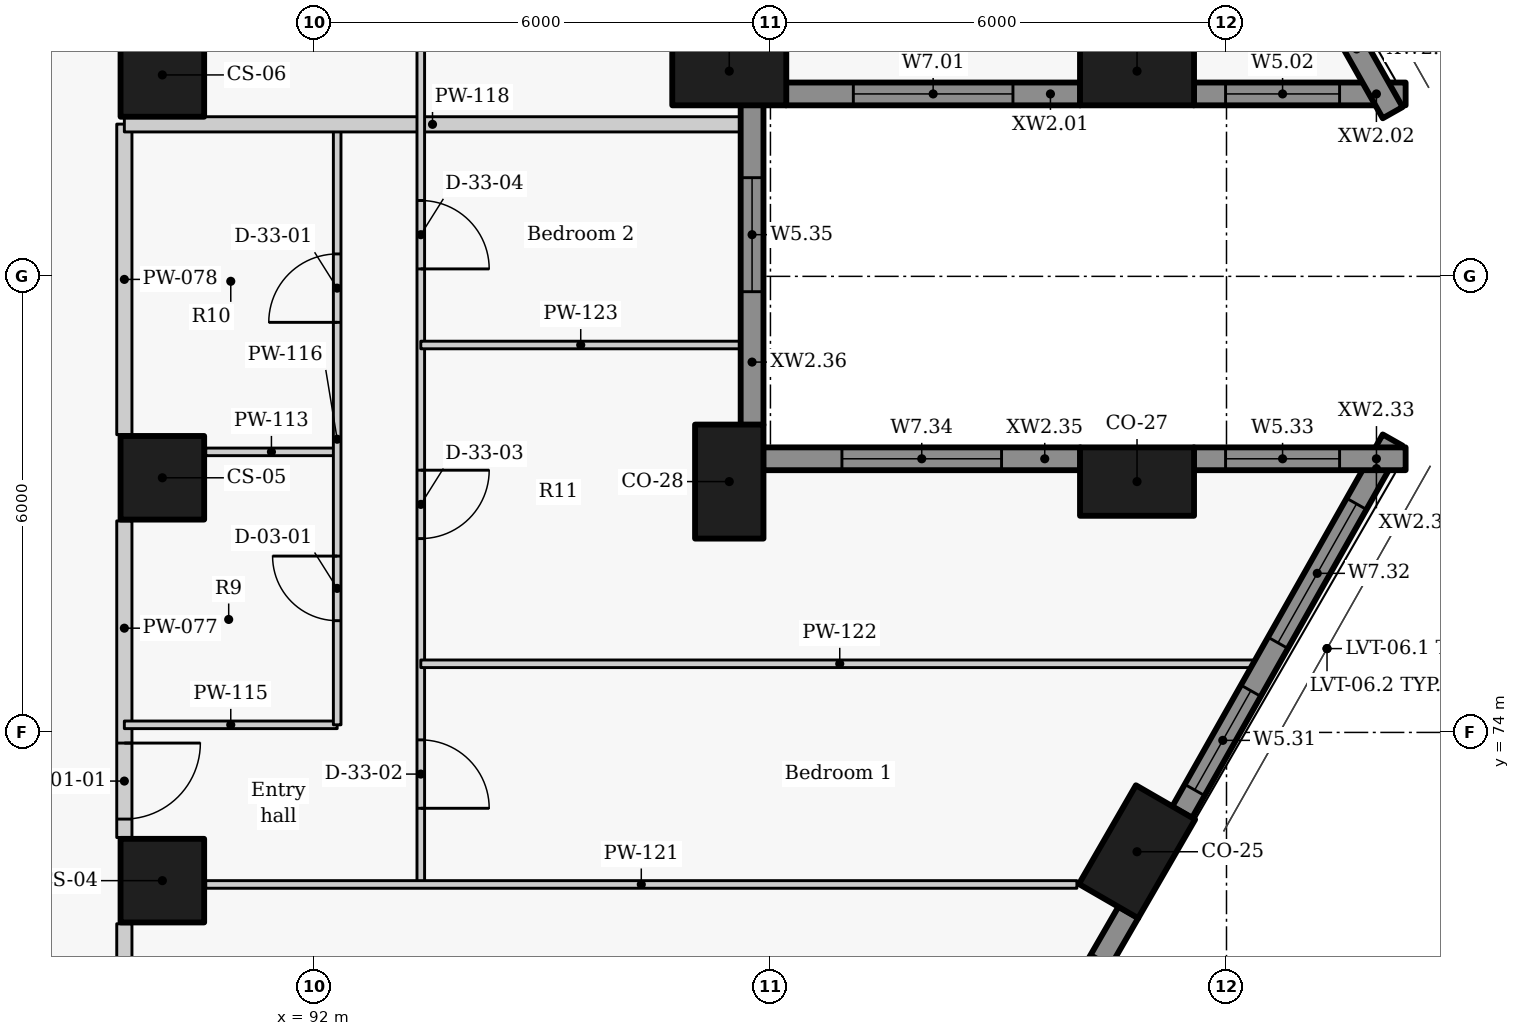
"""IFC4 building model, lengths in metres.
Left out: names, types, materials, properties, quantities, classifications, styles, units other than length and angle.
Written with IfcOpenShell. Run it as: python <this file> out.ifc"""

import sys

from ifc_helpers import new_model, si_unit, direction, frame, frame_2d, origin, origin_2d, place, context, subcontext, project, spatial, rectangle, extrude, element, fill, save


model = new_model("IFC4")
c1 = context("Model", 3, precision=1e-05, world=origin(), true_north=direction((0.0, 1.0)))
c2 = subcontext(c1, "Body", "Model", "MODEL_VIEW")
j1 = project(units=[si_unit("LENGTHUNIT", "METRE"), si_unit("PLANEANGLEUNIT", "RADIAN")], contexts=[c1])
p1 = place(None, origin())
s1 = spatial("IfcSite", under=j1, at=p1, CompositionType="ELEMENT")
p2 = place(p1, origin())
s2 = spatial("IfcBuilding", under=s1, at=p2, CompositionType="ELEMENT")
p3 = place(p2, frame((0.0, 0.0, 41.4)))
s3 = spatial("IfcBuildingStorey", under=s2, at=p3, CompositionType="ELEMENT", Elevation=41.4)
for number, where, z_axis, x_axis in (
    (1, (102.823, 72.43, -0.275), (0.0, 0.0, 1.0), (0.5, 0.866, 0.0)),
    (2, (102.823, 77.3, -0.275), (0.0, 0.0, 1.0), (-1.0, 0.0, 0.0)),
    (3, (97.458, 77.3, -0.275), (0.0, 0.0, 1.0), (0.0, 1.0, 0.0)),
    (4, (97.458, 82.7, -0.275), (0.0, 0.0, 1.0), (1.0, 0.0, 0.0)),
    (5, (102.823, 82.7, -0.275), (0.0, 0.0, 1.0), (1.0, 0.0, 0.0)),
):
    element("IfcColumn", number, at=place(p3, frame(where, z_axis=z_axis, x_axis=x_axis)), inside=s3, PredefinedType="COLUMN", context=c2, shape_type="SweptSolid", body=[
        extrude(rectangle(XDim=1.5, YDim=0.9, at=origin_2d()), origin(), (0.0, 0.0, 1.0), 3.575),
    ])
p4 = place(p3, frame((90.0, 72.05, 0.0), z_axis=(0.0, 0.0, 1.0), x_axis=(0.0, 1.0, 0.0)))
e6 = element("IfcColumn", 6, at=p4, inside=s3, PredefinedType="COLUMN", context=c2, shape_type="SweptSolid", body=[
    extrude(rectangle(XDim=1.1, YDim=1.1, at=origin_2d()), origin(), (0.0, 0.0, 1.0), 3.3),
])
for number, where, z_axis, x_axis in (
    (7, (90.0, 77.35, -0.275), (0.0, 0.0, 1.0), (0.0, 1.0, 0.0)),
    (8, (90.0, 82.65, -0.275), (0.0, 0.0, 1.0), (0.0, 1.0, 0.0)),
):
    element("IfcColumn", number, at=place(p3, frame(where, z_axis=z_axis, x_axis=x_axis)), inside=s3, PredefinedType="COLUMN", context=c2, shape_type="SweptSolid", body=[
        extrude(rectangle(XDim=1.1, YDim=1.1, at=origin_2d()), origin(), (0.0, 0.0, 1.0), 3.575),
    ])
p5 = place(p3, frame((98.204, 82.4, 0.0), z_axis=(0.0, 0.0, 1.0), x_axis=(1.0, 0.0, 0.0)))
e9 = element("IfcWall", 9, at=p5, inside=s3, PredefinedType="SOLIDWALL", context=c2, shape_type="SweptSolid", body=[
    extrude(rectangle(XDim=3.873, YDim=0.3, at=frame_2d((1.936, 0.0))), origin(), (0.0, 0.0, 1.0), 2.425),
])
p6 = place(p5, frame((0.886, 0.0, 0.9)))
e10 = element("IfcOpeningElement", 10, at=p6, cuts=e9, PredefinedType="OPENING", context=c2, shape_type="SweptSolid", body=[
    extrude(rectangle(XDim=2.1, YDim=1.1, at=frame_2d((1.05, 0.55))), frame((0.0, 0.16, 0.0), z_axis=(0.0, -1.0, 0.0), x_axis=(1.0, 0.0, 0.0)), (0.0, 0.0, 1.0), 0.32),
])
p7 = place(p3, frame((103.569, 82.4, 0.0), z_axis=(0.0, 0.0, 1.0), x_axis=(1.0, 0.0, 0.0)))
e11 = element("IfcWall", 11, at=p7, inside=s3, PredefinedType="SOLIDWALL", context=c2, shape_type="SweptSolid", body=[
    extrude(rectangle(XDim=2.788, YDim=0.3, at=frame_2d((1.394, 0.0))), origin(), (0.0, 0.0, 1.0), 2.425),
])
p8 = place(p7, frame((0.419, 0.0, 0.9)))
e12 = element("IfcOpeningElement", 12, at=p8, cuts=e11, PredefinedType="OPENING", context=c2, shape_type="SweptSolid", body=[
    extrude(rectangle(XDim=1.5, YDim=1.1, at=frame_2d((0.75, 0.55))), frame((0.0, 0.16, 0.0), z_axis=(0.0, -1.0, 0.0), x_axis=(1.0, 0.0, 0.0)), (0.0, 0.0, 1.0), 0.32),
])
p9 = place(p3, frame((106.186, 82.153, 0.0), z_axis=(0.0, 0.0, 1.0), x_axis=(-0.492363204642, 0.870389840655, 0.0)))
e13 = element("IfcWall", 13, at=p9, inside=s3, PredefinedType="SOLIDWALL", context=c2, shape_type="SweptSolid", body=[
    extrude(rectangle(XDim=5.626, YDim=0.3, at=frame_2d((2.813, 0.0))), origin(), (0.0, 0.0, 1.0), 2.425),
])
p10 = place(p9, frame((2.026, 0.0, 0.9)))
e14 = element("IfcOpeningElement", 14, at=p10, cuts=e13, PredefinedType="OPENING", context=c2, shape_type="SweptSolid", body=[
    extrude(rectangle(XDim=2.1, YDim=1.1, at=frame_2d((1.05, 0.55))), frame((0.0, 0.16, 0.0), z_axis=(0.0, -1.0, 0.0), x_axis=(1.0, 0.0, 0.0)), (0.0, 0.0, 1.0), 0.32),
])
p11 = place(p3, frame((100.941, 68.571, 0.0), z_axis=(0.0, 0.0, 1.0), x_axis=(0.499977402622, 0.866038449993, 0.0)))
e15 = element("IfcWall", 15, at=p11, inside=s3, PredefinedType="SOLIDWALL", context=c2, shape_type="SweptSolid", body=[
    extrude(rectangle(XDim=3.537, YDim=0.3, at=frame_2d((1.769, 0.0))), origin(), (0.0, 0.0, 1.0), 2.425),
])
p12 = place(p11, frame((0.719, 0.0, 0.9)))
e16 = element("IfcOpeningElement", 16, at=p12, cuts=e15, PredefinedType="OPENING", context=c2, shape_type="SweptSolid", body=[
    extrude(rectangle(XDim=2.1, YDim=1.1, at=frame_2d((1.05, 0.55))), frame((0.0, 0.16, 0.0), z_axis=(0.0, -1.0, 0.0), x_axis=(1.0, 0.0, 0.0)), (0.0, 0.0, 1.0), 0.32),
])
p13 = place(p3, frame((103.416, 72.949, 0.0), z_axis=(0.0, 0.0, 1.0), x_axis=(0.492363204642, 0.870389840655, 0.0)))
e17 = element("IfcWall", 17, at=p13, inside=s3, PredefinedType="SOLIDWALL", context=c2, shape_type="SweptSolid", body=[
    extrude(rectangle(XDim=5.626, YDim=0.3, at=frame_2d((2.813, 0.0))), origin(), (0.0, 0.0, 1.0), 2.425),
])
p14 = place(p13, frame((0.337, 0.0, 0.9)))
e18 = element("IfcOpeningElement", 18, at=p14, cuts=e17, PredefinedType="OPENING", context=c2, shape_type="SweptSolid", body=[
    extrude(rectangle(XDim=1.5, YDim=1.1, at=frame_2d((0.75, 0.55))), frame((0.0, 0.16, 0.0), z_axis=(0.0, -1.0, 0.0), x_axis=(1.0, 0.0, 0.0)), (0.0, 0.0, 1.0), 0.32),
])
p15 = place(p13, frame((2.562, 0.0, 0.9)))
e19 = element("IfcOpeningElement", 19, at=p15, cuts=e17, PredefinedType="OPENING", context=c2, shape_type="SweptSolid", body=[
    extrude(rectangle(XDim=2.1, YDim=1.1, at=frame_2d((1.05, 0.55))), frame((0.0, 0.16, 0.0), z_axis=(0.0, -1.0, 0.0), x_axis=(1.0, 0.0, 0.0)), (0.0, 0.0, 1.0), 0.32),
])
p16 = place(p3, frame((106.357, 77.6, 0.0), z_axis=(0.0, 0.0, 1.0), x_axis=(-1.0, 0.0, 0.0)))
e20 = element("IfcWall", 20, at=p16, inside=s3, PredefinedType="SOLIDWALL", context=c2, shape_type="SweptSolid", body=[
    extrude(rectangle(XDim=2.788, YDim=0.3, at=frame_2d((1.394, 0.0))), origin(), (0.0, 0.0, 1.0), 2.425),
])
p17 = place(p16, frame((0.869, 0.0, 0.9)))
e21 = element("IfcOpeningElement", 21, at=p17, cuts=e20, PredefinedType="OPENING", context=c2, shape_type="SweptSolid", body=[
    extrude(rectangle(XDim=1.5, YDim=1.1, at=frame_2d((0.75, 0.55))), frame((0.0, 0.16, 0.0), z_axis=(0.0, -1.0, 0.0), x_axis=(1.0, 0.0, 0.0)), (0.0, 0.0, 1.0), 0.32),
])
p18 = place(p3, frame((102.077, 77.6, 0.0), z_axis=(0.0, 0.0, 1.0), x_axis=(-1.0, 0.0, 0.0)))
e22 = element("IfcWall", 22, at=p18, inside=s3, PredefinedType="SOLIDWALL", context=c2, shape_type="SweptSolid", body=[
    extrude(rectangle(XDim=4.173, YDim=0.3, at=frame_2d((2.086, 0.0))), origin(), (0.0, 0.0, 1.0), 2.425),
])
p19 = place(p18, frame((1.036, 0.0, 0.9)))
e23 = element("IfcOpeningElement", 23, at=p19, cuts=e22, PredefinedType="OPENING", context=c2, shape_type="SweptSolid", body=[
    extrude(rectangle(XDim=2.1, YDim=1.1, at=frame_2d((1.05, 0.55))), frame((0.0, 0.16, 0.0), z_axis=(0.0, -1.0, 0.0), x_axis=(1.0, 0.0, 0.0)), (0.0, 0.0, 1.0), 0.32),
])
p20 = place(p3, frame((97.758, 78.046, 0.0), z_axis=(0.0, 0.0, 1.0), x_axis=(0.0, 1.0, 0.0)))
e24 = element("IfcWall", 24, at=p20, inside=s3, PredefinedType="SOLIDWALL", context=c2, shape_type="SweptSolid", body=[
    extrude(rectangle(XDim=4.208, YDim=0.3, at=frame_2d((2.104, 0.0))), origin(), (0.0, 0.0, 1.0), 2.425),
])
p21 = place(p20, frame((1.752, 0.0, 0.9)))
e25 = element("IfcOpeningElement", 25, at=p21, cuts=e24, PredefinedType="OPENING", context=c2, shape_type="SweptSolid", body=[
    extrude(rectangle(XDim=1.5, YDim=1.1, at=frame_2d((0.75, 0.55))), frame((0.0, 0.16, 0.0), z_axis=(0.0, -1.0, 0.0), x_axis=(1.0, 0.0, 0.0)), (0.0, 0.0, 1.0), 0.32),
])
p22 = place(p3, frame((89.5, 71.483, 0.0), z_axis=(0.0, 0.0, 1.0), x_axis=(0.0, -1.0, 0.0)))
e26 = element("IfcWall", 26, at=p22, inside=s3, PredefinedType="PARTITIONING", context=c2, shape_type="SweptSolid", body=[
    extrude(rectangle(XDim=3.216, YDim=0.2, at=frame_2d((1.608, 0.0))), origin(), (0.0, 0.0, 1.0), 3.025),
])
p23 = place(p22, frame((1.108, 0.0, 0.0)))
e27 = element("IfcOpeningElement", 27, at=p23, cuts=e26, PredefinedType="OPENING", context=c2, shape_type="SweptSolid", body=[
    extrude(rectangle(XDim=1.0, YDim=2.1, at=frame_2d((0.5, 1.05))), frame((0.0, 0.11, 0.0), z_axis=(0.0, -1.0, 0.0), x_axis=(1.0, 0.0, 0.0)), (0.0, 0.0, 1.0), 0.22),
])
p24 = place(p3, frame((89.5, 76.783, 0.0), z_axis=(0.0, 0.0, 1.0), x_axis=(0.0, -1.0, 0.0)))
e28 = element("IfcWall", 28, at=p24, inside=s3, PredefinedType="PARTITIONING", context=c2, shape_type="SweptSolid", body=[
    extrude(rectangle(XDim=4.166, YDim=0.2, at=frame_2d((2.083, 0.0))), origin(), (0.0, 0.0, 1.0), 3.025),
])
p25 = place(p24, frame((2.923, 0.0, 0.0)))
e29 = element("IfcOpeningElement", 29, at=p25, cuts=e28, PredefinedType="OPENING", context=c2, shape_type="SweptSolid", body=[
    extrude(rectangle(XDim=1.0, YDim=2.1, at=frame_2d((0.5, 1.05))), frame((0.0, 0.11, 0.0), z_axis=(0.0, -1.0, 0.0), x_axis=(1.0, 0.0, 0.0)), (0.0, 0.0, 1.0), 0.22),
])
p26 = place(p3, frame((89.5, 77.917, 0.0), z_axis=(0.0, 0.0, 1.0), x_axis=(0.0, 1.0, 0.0)))
e30 = element("IfcWall", 30, at=p26, inside=s3, PredefinedType="PARTITIONING", context=c2, shape_type="SweptSolid", body=[
    extrude(rectangle(XDim=4.086, YDim=0.2, at=frame_2d((2.043, 0.0))), origin(), (0.0, 0.0, 1.0), 3.025),
])
p27 = place(p3, frame((90.57, 77.691, 0.0), z_axis=(0.0, 0.0, 1.0), x_axis=(1.0, 0.0, 0.0)))
e31 = element("IfcWall", 31, at=p27, inside=s3, PredefinedType="PARTITIONING", context=c2, shape_type="SweptSolid", body=[
    extrude(rectangle(XDim=1.73, YDim=0.1, at=frame_2d((0.865, 0.0))), origin(), (0.0, 0.0, 1.0), 3.025),
])
p28 = place(p3, frame((89.5, 74.1, 0.0), z_axis=(0.0, 0.0, 1.0), x_axis=(1.0, 0.0, 0.0)))
e32 = element("IfcWall", 32, at=p28, inside=s3, PredefinedType="PARTITIONING", context=c2, shape_type="SweptSolid", body=[
    extrude(rectangle(XDim=2.8, YDim=0.1, at=frame_2d((1.4, 0.0))), origin(), (0.0, 0.0, 1.0), 2.505),
])
p29 = place(p3, frame((92.3, 74.1, 0.0), z_axis=(0.0, 0.0, 1.0), x_axis=(0.0, 1.0, 0.0)))
e33 = element("IfcWall", 33, at=p29, inside=s3, PredefinedType="PARTITIONING", context=c2, shape_type="SweptSolid", body=[
    extrude(rectangle(XDim=7.9, YDim=0.1, at=frame_2d((3.95, 0.0))), origin(), (0.0, 0.0, 1.0), 3.025),
])
p30 = place(p29, frame((1.37, 0.0, 0.0)))
e34 = element("IfcOpeningElement", 34, at=p30, cuts=e33, PredefinedType="OPENING", context=c2, shape_type="SweptSolid", body=[
    extrude(rectangle(XDim=0.85, YDim=2.1, at=frame_2d((0.425, 1.05))), frame((0.0, 0.06, 0.0), z_axis=(0.0, -1.0, 0.0), x_axis=(1.0, 0.0, 0.0)), (0.0, 0.0, 1.0), 0.12),
])
p31 = place(p29, frame((5.295, 0.0, 0.0)))
e35 = element("IfcOpeningElement", 35, at=p31, cuts=e33, PredefinedType="OPENING", context=c2, shape_type="SweptSolid", body=[
    extrude(rectangle(XDim=0.9, YDim=2.1, at=frame_2d((0.45, 1.05))), frame((0.0, 0.06, 0.0), z_axis=(0.0, -1.0, 0.0), x_axis=(1.0, 0.0, 0.0)), (0.0, 0.0, 1.0), 0.12),
])
p32 = place(p3, frame((89.5, 82.0, 0.0), z_axis=(0.0, 0.0, 1.0), x_axis=(1.0, 0.0, 0.0)))
e36 = element("IfcWall", 36, at=p32, inside=s3, PredefinedType="PARTITIONING", context=c2, shape_type="SweptSolid", body=[
    extrude(rectangle(XDim=8.108, YDim=0.2, at=frame_2d((4.054, 0.0))), origin(), (0.0, 0.0, 1.0), 2.405),
])
p33 = place(p3, frame((93.4, 90.0, 0.0), z_axis=(0.0, 0.0, 1.0), x_axis=(0.0, -1.0, 0.0)))
e37 = element("IfcWall", 37, at=p33, inside=s3, PredefinedType="PARTITIONING", context=c2, shape_type="SweptSolid", body=[
    extrude(rectangle(XDim=18.0, YDim=0.1, at=frame_2d((9.0, 0.0))), origin(), (0.0, 0.0, 1.0), 3.025),
])
p34 = place(p33, frame((16.098, 0.0, 0.0)))
e38 = element("IfcOpeningElement", 38, at=p34, cuts=e37, PredefinedType="OPENING", context=c2, shape_type="SweptSolid", body=[
    extrude(rectangle(XDim=0.9, YDim=2.1, at=frame_2d((0.45, 1.05))), frame((0.0, 0.06, 0.0), z_axis=(0.0, -1.0, 0.0), x_axis=(1.0, 0.0, 0.0)), (0.0, 0.0, 1.0), 0.12),
])
p35 = place(p33, frame((12.55, 0.0, 0.0)))
e39 = element("IfcOpeningElement", 39, at=p35, cuts=e37, PredefinedType="OPENING", context=c2, shape_type="SweptSolid", body=[
    extrude(rectangle(XDim=0.9, YDim=2.1, at=frame_2d((0.45, 1.05))), frame((0.0, 0.06, 0.0), z_axis=(0.0, -1.0, 0.0), x_axis=(1.0, 0.0, 0.0)), (0.0, 0.0, 1.0), 0.12),
])
p36 = place(p33, frame((9.002, 0.0, 0.0)))
e40 = element("IfcOpeningElement", 40, at=p36, cuts=e37, PredefinedType="OPENING", context=c2, shape_type="SweptSolid", body=[
    extrude(rectangle(XDim=0.9, YDim=2.1, at=frame_2d((0.45, 1.05))), frame((0.0, 0.06, 0.0), z_axis=(0.0, -1.0, 0.0), x_axis=(1.0, 0.0, 0.0)), (0.0, 0.0, 1.0), 0.12),
])
p37 = place(p33, frame((3.55, 0.0, 0.0)))
e41 = element("IfcOpeningElement", 41, at=p37, cuts=e37, PredefinedType="OPENING", context=c2, shape_type="SweptSolid", body=[
    extrude(rectangle(XDim=0.9, YDim=2.1, at=frame_2d((0.45, 1.05))), frame((0.0, 0.06, 0.0), z_axis=(0.0, -1.0, 0.0), x_axis=(1.0, 0.0, 0.0)), (0.0, 0.0, 1.0), 0.12),
])
p38 = place(p3, frame((90.57, 72.0, 0.0), z_axis=(0.0, 0.0, 1.0), x_axis=(1.0, 0.0, 0.0)))
e42 = element("IfcWall", 42, at=p38, inside=s3, PredefinedType="PARTITIONING", context=c2, shape_type="SweptSolid", body=[
    extrude(rectangle(XDim=11.462, YDim=0.1, at=frame_2d((5.731, 0.0))), origin(), (0.0, 0.0, 1.0), 3.025),
])
p39 = place(p3, frame((93.4, 74.903, 0.0), z_axis=(0.0, 0.0, 1.0), x_axis=(1.0, 0.0, 0.0)))
e43 = element("IfcWall", 43, at=p39, inside=s3, PredefinedType="PARTITIONING", context=c2, shape_type="SweptSolid", body=[
    extrude(rectangle(XDim=11.024, YDim=0.1, at=frame_2d((5.512, 0.0))), origin(), (0.0, 0.0, 1.0), 2.405),
])
p40 = place(p3, frame((93.4, 79.097, 0.0), z_axis=(0.0, 0.0, 1.0), x_axis=(1.0, 0.0, 0.0)))
e44 = element("IfcWall", 44, at=p40, inside=s3, PredefinedType="PARTITIONING", context=c2, shape_type="SweptSolid", body=[
    extrude(rectangle(XDim=4.208, YDim=0.1, at=frame_2d((2.104, 0.0))), origin(), (0.0, 0.0, 1.0), 2.405),
])
p41 = place(p6, origin())
e45 = element("IfcWindow", 45, at=p41, inside=s3, PartitioningType="SINGLE_PANEL", PredefinedType="WINDOW", context=c2, shape_type="SweptSolid", body=[
    extrude(rectangle(XDim=2.1, YDim=1.1, at=frame_2d((1.05, 0.55))), frame((0.0, 0.03, 0.0), z_axis=(0.0, -1.0, 0.0), x_axis=(1.0, 0.0, 0.0)), (0.0, 0.0, 1.0), 0.06),
])
fill(e10, e45)
p42 = place(p8, origin())
e46 = element("IfcWindow", 46, at=p42, inside=s3, PartitioningType="SINGLE_PANEL", PredefinedType="WINDOW", context=c2, shape_type="SweptSolid", body=[
    extrude(rectangle(XDim=1.5, YDim=1.1, at=frame_2d((0.75, 0.55))), frame((0.0, 0.03, 0.0), z_axis=(0.0, -1.0, 0.0), x_axis=(1.0, 0.0, 0.0)), (0.0, 0.0, 1.0), 0.06),
])
fill(e12, e46)
p43 = place(p14, origin())
e47 = element("IfcWindow", 47, at=p43, inside=s3, PartitioningType="SINGLE_PANEL", PredefinedType="WINDOW", context=c2, shape_type="SweptSolid", body=[
    extrude(rectangle(XDim=1.5, YDim=1.1, at=frame_2d((0.75, 0.55))), frame((0.0, 0.03, 0.0), z_axis=(0.0, -1.0, 0.0), x_axis=(1.0, 0.0, 0.0)), (0.0, 0.0, 1.0), 0.06),
])
fill(e18, e47)
p44 = place(p15, origin())
e48 = element("IfcWindow", 48, at=p44, inside=s3, PartitioningType="SINGLE_PANEL", PredefinedType="WINDOW", context=c2, shape_type="SweptSolid", body=[
    extrude(rectangle(XDim=2.1, YDim=1.1, at=frame_2d((1.05, 0.55))), frame((0.0, 0.03, 0.0), z_axis=(0.0, -1.0, 0.0), x_axis=(1.0, 0.0, 0.0)), (0.0, 0.0, 1.0), 0.06),
])
fill(e19, e48)
p45 = place(p17, origin())
e49 = element("IfcWindow", 49, at=p45, inside=s3, PartitioningType="SINGLE_PANEL", PredefinedType="WINDOW", context=c2, shape_type="SweptSolid", body=[
    extrude(rectangle(XDim=1.5, YDim=1.1, at=frame_2d((0.75, 0.55))), frame((0.0, 0.03, 0.0), z_axis=(0.0, -1.0, 0.0), x_axis=(1.0, 0.0, 0.0)), (0.0, 0.0, 1.0), 0.06),
])
fill(e21, e49)
p46 = place(p19, origin())
e50 = element("IfcWindow", 50, at=p46, inside=s3, PartitioningType="SINGLE_PANEL", PredefinedType="WINDOW", context=c2, shape_type="SweptSolid", body=[
    extrude(rectangle(XDim=2.1, YDim=1.1, at=frame_2d((1.05, 0.55))), frame((0.0, 0.03, 0.0), z_axis=(0.0, -1.0, 0.0), x_axis=(1.0, 0.0, 0.0)), (0.0, 0.0, 1.0), 0.06),
])
fill(e23, e50)
p47 = place(p21, origin())
e51 = element("IfcWindow", 51, at=p47, inside=s3, PartitioningType="SINGLE_PANEL", PredefinedType="WINDOW", context=c2, shape_type="SweptSolid", body=[
    extrude(rectangle(XDim=1.5, YDim=1.1, at=frame_2d((0.75, 0.55))), frame((0.0, 0.03, 0.0), z_axis=(0.0, -1.0, 0.0), x_axis=(1.0, 0.0, 0.0)), (0.0, 0.0, 1.0), 0.06),
])
fill(e25, e51)
p48 = place(p25, origin())
e52 = element("IfcDoor", 52, at=p48, inside=s3, OperationType="SINGLE_SWING_LEFT", PredefinedType="DOOR", context=c2, shape_type="SweptSolid", body=[
    extrude(rectangle(XDim=1.0, YDim=2.1, at=frame_2d((0.5, 1.05))), frame((0.0, 0.025, 0.0), z_axis=(0.0, -1.0, 0.0), x_axis=(1.0, 0.0, 0.0)), (0.0, 0.0, 1.0), 0.05),
])
fill(e29, e52)
p49 = place(p30, origin())
e53 = element("IfcDoor", 53, at=p49, inside=s3, OperationType="SINGLE_SWING_RIGHT", PredefinedType="DOOR", context=c2, shape_type="SweptSolid", body=[
    extrude(rectangle(XDim=0.85, YDim=2.1, at=frame_2d((0.425, 1.05))), frame((0.0, 0.025, 0.0), z_axis=(0.0, -1.0, 0.0), x_axis=(1.0, 0.0, 0.0)), (0.0, 0.0, 1.0), 0.05),
])
fill(e34, e53)
p50 = place(p31, origin())
e54 = element("IfcDoor", 54, at=p50, inside=s3, OperationType="SINGLE_SWING_LEFT", PredefinedType="DOOR", context=c2, shape_type="SweptSolid", body=[
    extrude(rectangle(XDim=0.9, YDim=2.1, at=frame_2d((0.45, 1.05))), frame((0.0, 0.025, 0.0), z_axis=(0.0, -1.0, 0.0), x_axis=(1.0, 0.0, 0.0)), (0.0, 0.0, 1.0), 0.05),
])
fill(e35, e54)
p51 = place(p34, origin())
e55 = element("IfcDoor", 55, at=p51, inside=s3, OperationType="SINGLE_SWING_RIGHT", PredefinedType="DOOR", context=c2, shape_type="SweptSolid", body=[
    extrude(rectangle(XDim=0.9, YDim=2.1, at=frame_2d((0.45, 1.05))), frame((0.0, 0.025, 0.0), z_axis=(0.0, -1.0, 0.0), x_axis=(1.0, 0.0, 0.0)), (0.0, 0.0, 1.0), 0.05),
])
fill(e38, e55)
p52 = place(p35, origin())
e56 = element("IfcDoor", 56, at=p52, inside=s3, OperationType="SINGLE_SWING_LEFT", PredefinedType="DOOR", context=c2, shape_type="SweptSolid", body=[
    extrude(rectangle(XDim=0.9, YDim=2.1, at=frame_2d((0.45, 1.05))), frame((0.0, 0.025, 0.0), z_axis=(0.0, -1.0, 0.0), x_axis=(1.0, 0.0, 0.0)), (0.0, 0.0, 1.0), 0.05),
])
fill(e39, e56)
p53 = place(p36, origin())
e57 = element("IfcDoor", 57, at=p53, inside=s3, OperationType="SINGLE_SWING_RIGHT", PredefinedType="DOOR", context=c2, shape_type="SweptSolid", body=[
    extrude(rectangle(XDim=0.9, YDim=2.1, at=frame_2d((0.45, 1.05))), frame((0.0, 0.025, 0.0), z_axis=(0.0, -1.0, 0.0), x_axis=(1.0, 0.0, 0.0)), (0.0, 0.0, 1.0), 0.05),
])
fill(e40, e57)
save(model, sys.argv[1])
